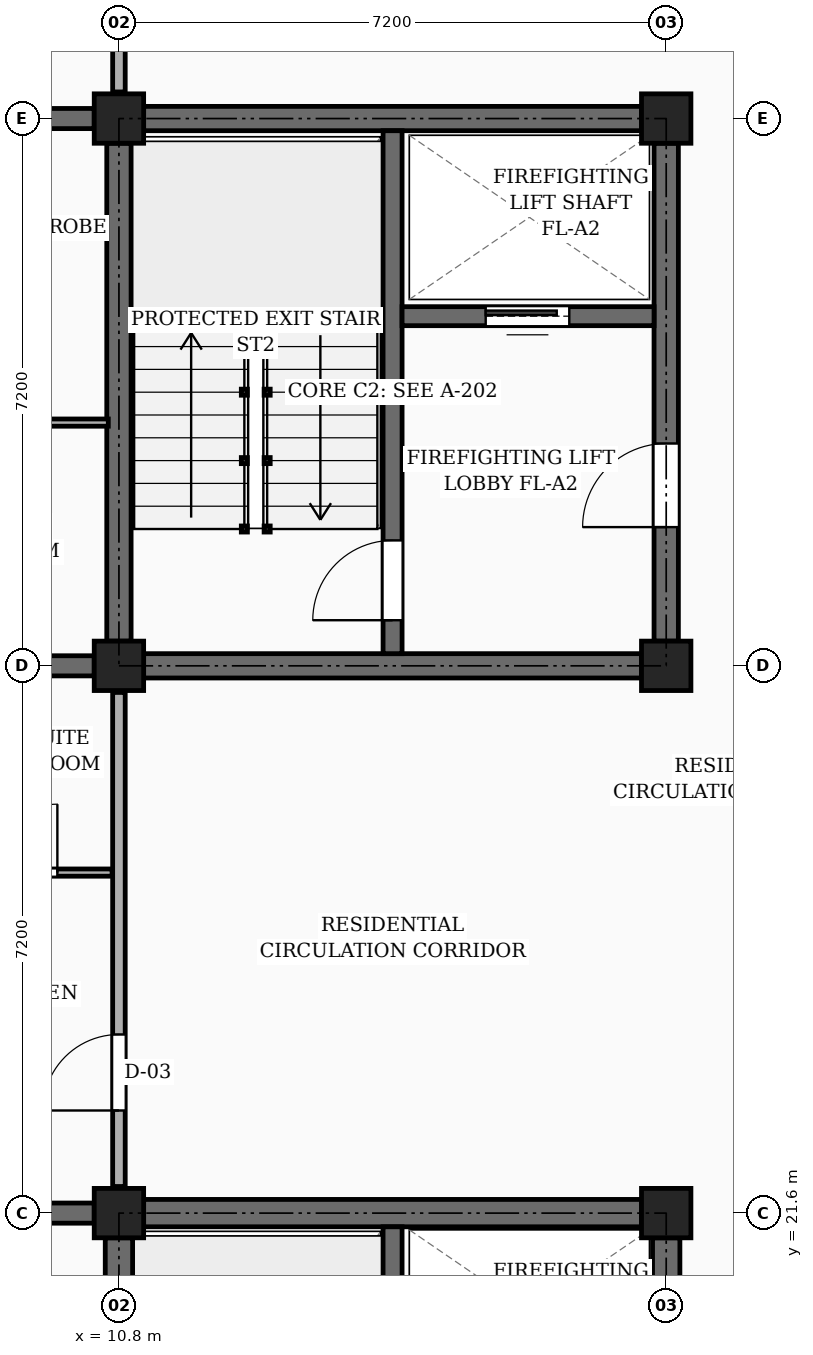
"""IFC4 building model, lengths in metres.
Left out: names, types, materials, properties, quantities, classifications, styles, units other than length and angle.
Written with IfcOpenShell. Run it as: python <this file> out.ifc"""

import sys

from ifc_helpers import new_model, si_unit, direction, frame, frame_2d, origin, origin_2d, place, context, subcontext, project, spatial, rectangle, extrude, element, fill, save


model = new_model("IFC4")
c1 = context("Model", 3, precision=1e-05, world=origin(), true_north=direction((0.0, 1.0)))
c2 = subcontext(c1, "Body", "Model", "MODEL_VIEW")
j1 = project(units=[si_unit("LENGTHUNIT", "METRE"), si_unit("PLANEANGLEUNIT", "RADIAN")], contexts=[c1])
p1 = place(None, origin())
s1 = spatial("IfcSite", under=j1, at=p1, CompositionType="ELEMENT")
p2 = place(p1, origin())
s2 = spatial("IfcBuilding", under=s1, at=p2, CompositionType="ELEMENT")
p3 = place(p2, frame((0.0, 0.0, 4.5)))
s3 = spatial("IfcBuildingStorey", under=s2, at=p3, CompositionType="ELEMENT", Elevation=4.5)
for number, where, z_axis, x_axis in (
    (1, (10.8, 21.6, 0.0), (0.0, 0.0, 1.0), (1.0, 0.0, 0.0)),
    (2, (10.8, 28.8, 0.0), (0.0, 0.0, 1.0), (1.0, 0.0, 0.0)),
    (3, (10.8, 36.0, 0.0), (0.0, 0.0, 1.0), (1.0, 0.0, 0.0)),
    (4, (18.0, 21.6, 0.0), (0.0, 0.0, 1.0), (1.0, 0.0, 0.0)),
    (5, (18.0, 28.8, 0.0), (0.0, 0.0, 1.0), (1.0, 0.0, 0.0)),
    (6, (18.0, 36.0, 0.0), (0.0, 0.0, 1.0), (1.0, 0.0, 0.0)),
):
    element("IfcColumn", number, at=place(p3, frame(where, z_axis=z_axis, x_axis=x_axis)), inside=s3, PredefinedType="COLUMN", context=c2, shape_type="SweptSolid", body=[
        extrude(rectangle(XDim=0.65, YDim=0.65, at=origin_2d()), origin(), (0.0, 0.0, 1.0), 3.15),
    ])
p4 = place(p3, frame((3.9, 21.6, 0.0), z_axis=(0.0, 0.0, 1.0), x_axis=(1.0, 0.0, 0.0)))
e7 = element("IfcWall", 7, at=p4, inside=s3, PredefinedType="SOLIDWALL", context=c2, shape_type="SweptSolid", body=[
    extrude(rectangle(XDim=6.575, YDim=0.265, at=frame_2d((3.288, 0.0))), origin(), (0.0, 0.0, 1.0), 2.17),
])
p5 = place(p3, frame((3.9, 28.8, 0.0), z_axis=(0.0, 0.0, 1.0), x_axis=(1.0, 0.0, 0.0)))
e8 = element("IfcWall", 8, at=p5, inside=s3, PredefinedType="SOLIDWALL", context=c2, shape_type="SweptSolid", body=[
    extrude(rectangle(XDim=6.575, YDim=0.265, at=frame_2d((3.288, 0.0))), origin(), (0.0, 0.0, 1.0), 2.17),
])
p6 = place(p5, frame((1.35, 0.0, 0.0)))
e9 = element("IfcOpeningElement", 9, at=p6, cuts=e8, PredefinedType="OPENING", context=c2, shape_type="SweptSolid", body=[
    extrude(rectangle(XDim=0.98, YDim=2.12, at=frame_2d((0.49, 1.06))), frame((0.0, 0.143, 0.0), z_axis=(0.0, -1.0, 0.0), x_axis=(1.0, 0.0, 0.0)), (0.0, 0.0, 1.0), 0.285),
])
p7 = place(p3, frame((3.9, 36.0, 0.0), z_axis=(0.0, 0.0, 1.0), x_axis=(1.0, 0.0, 0.0)))
e10 = element("IfcWall", 10, at=p7, inside=s3, PredefinedType="SOLIDWALL", context=c2, shape_type="SweptSolid", body=[
    extrude(rectangle(XDim=6.575, YDim=0.265, at=frame_2d((3.288, 0.0))), origin(), (0.0, 0.0, 1.0), 2.17),
])
p8 = place(p3, frame((10.8, 14.725, 0.0), z_axis=(0.0, 0.0, 1.0), x_axis=(0.0, 1.0, 0.0)))
e11 = element("IfcWall", 11, at=p8, inside=s3, PredefinedType="SHEAR", context=c2, shape_type="SweptSolid", body=[
    extrude(rectangle(XDim=6.55, YDim=0.36, at=frame_2d((3.275, 0.0))), origin(), (0.0, 0.0, 1.0), 2.87),
])
p9 = place(p3, frame((11.125, 21.6, 0.0), z_axis=(0.0, 0.0, 1.0), x_axis=(1.0, 0.0, 0.0)))
e12 = element("IfcWall", 12, at=p9, inside=s3, PredefinedType="SHEAR", context=c2, shape_type="SweptSolid", body=[
    extrude(rectangle(XDim=6.55, YDim=0.36, at=frame_2d((3.275, 0.0))), origin(), (0.0, 0.0, 1.0), 2.87),
])
p10 = place(p3, frame((18.0, 14.725, 0.0), z_axis=(0.0, 0.0, 1.0), x_axis=(0.0, 1.0, 0.0)))
e13 = element("IfcWall", 13, at=p10, inside=s3, PredefinedType="SHEAR", context=c2, shape_type="SweptSolid", body=[
    extrude(rectangle(XDim=6.55, YDim=0.36, at=frame_2d((3.275, 0.0))), origin(), (0.0, 0.0, 1.0), 2.87),
])
p11 = place(p10, frame((1.5, 0.0, 0.0)))
e14 = element("IfcOpeningElement", 14, at=p11, cuts=e13, PredefinedType="OPENING", context=c2, shape_type="SweptSolid", body=[
    extrude(rectangle(XDim=1.1, YDim=2.15, at=frame_2d((0.55, 1.075))), frame((0.0, 0.19, 0.0), z_axis=(0.0, -1.0, 0.0), x_axis=(1.0, 0.0, 0.0)), (0.0, 0.0, 1.0), 0.38),
])
p12 = place(p3, frame((14.4, 14.58, 0.0), z_axis=(0.0, 0.0, 1.0), x_axis=(0.0, 1.0, 0.0)))
e15 = element("IfcWall", 15, at=p12, inside=s3, PredefinedType="SHEAR", context=c2, shape_type="SweptSolid", body=[
    extrude(rectangle(XDim=6.84, YDim=0.25, at=frame_2d((3.42, 0.0))), origin(), (0.0, 0.0, 1.0), 2.87),
])
p13 = place(p12, frame((0.42, 0.0, 0.0)))
e16 = element("IfcOpeningElement", 16, at=p13, cuts=e15, PredefinedType="OPENING", context=c2, shape_type="SweptSolid", body=[
    extrude(rectangle(XDim=1.05, YDim=2.15, at=frame_2d((0.525, 1.075))), frame((0.0, 0.135, 0.0), z_axis=(0.0, -1.0, 0.0), x_axis=(1.0, 0.0, 0.0)), (0.0, 0.0, 1.0), 0.27),
])
for number, where, z_axis, x_axis in (
    (17, (10.8, 29.125, 0.0), (0.0, 0.0, 1.0), (0.0, 1.0, 0.0)),
    (18, (11.125, 36.0, 0.0), (0.0, 0.0, 1.0), (1.0, 0.0, 0.0)),
):
    element("IfcWall", number, at=place(p3, frame(where, z_axis=z_axis, x_axis=x_axis)), inside=s3, PredefinedType="SHEAR", context=c2, shape_type="SweptSolid", body=[
        extrude(rectangle(XDim=6.55, YDim=0.32, at=frame_2d((3.275, 0.0))), origin(), (0.0, 0.0, 1.0), 2.87),
    ])
p14 = place(p3, frame((18.0, 29.125, 0.0), z_axis=(0.0, 0.0, 1.0), x_axis=(0.0, 1.0, 0.0)))
e19 = element("IfcWall", 19, at=p14, inside=s3, PredefinedType="SHEAR", context=c2, shape_type="SweptSolid", body=[
    extrude(rectangle(XDim=6.55, YDim=0.32, at=frame_2d((3.275, 0.0))), origin(), (0.0, 0.0, 1.0), 2.87),
])
p15 = place(p14, frame((1.5, 0.0, 0.0)))
e20 = element("IfcOpeningElement", 20, at=p15, cuts=e19, PredefinedType="OPENING", context=c2, shape_type="SweptSolid", body=[
    extrude(rectangle(XDim=1.1, YDim=2.15, at=frame_2d((0.55, 1.075))), frame((0.0, 0.17, 0.0), z_axis=(0.0, -1.0, 0.0), x_axis=(1.0, 0.0, 0.0)), (0.0, 0.0, 1.0), 0.34),
])
p16 = place(p3, frame((11.125, 28.8, 0.0), z_axis=(0.0, 0.0, 1.0), x_axis=(1.0, 0.0, 0.0)))
e21 = element("IfcWall", 21, at=p16, inside=s3, PredefinedType="SHEAR", context=c2, shape_type="SweptSolid", body=[
    extrude(rectangle(XDim=6.55, YDim=0.32, at=frame_2d((3.275, 0.0))), origin(), (0.0, 0.0, 1.0), 2.87),
])
p17 = place(p3, frame((14.4, 28.96, 0.0), z_axis=(0.0, 0.0, 1.0), x_axis=(0.0, 1.0, 0.0)))
e22 = element("IfcWall", 22, at=p17, inside=s3, PredefinedType="SHEAR", context=c2, shape_type="SweptSolid", body=[
    extrude(rectangle(XDim=6.88, YDim=0.25, at=frame_2d((3.44, 0.0))), origin(), (0.0, 0.0, 1.0), 2.87),
])
p18 = place(p17, frame((0.44, 0.0, 0.0)))
e23 = element("IfcOpeningElement", 23, at=p18, cuts=e22, PredefinedType="OPENING", context=c2, shape_type="SweptSolid", body=[
    extrude(rectangle(XDim=1.05, YDim=2.15, at=frame_2d((0.525, 1.075))), frame((0.0, 0.135, 0.0), z_axis=(0.0, -1.0, 0.0), x_axis=(1.0, 0.0, 0.0)), (0.0, 0.0, 1.0), 0.27),
])
p19 = place(p3, frame((14.525, 33.4, 0.0), z_axis=(0.0, 0.0, 1.0), x_axis=(1.0, 0.0, 0.0)))
e24 = element("IfcWall", 24, at=p19, inside=s3, PredefinedType="SHEAR", context=c2, shape_type="SweptSolid", body=[
    extrude(rectangle(XDim=3.315, YDim=0.25, at=frame_2d((1.658, 0.0))), origin(), (0.0, 0.0, 1.0), 2.87),
])
p20 = place(p19, frame((1.1, 0.0, 0.0)))
e25 = element("IfcOpeningElement", 25, at=p20, cuts=e24, PredefinedType="OPENING", context=c2, shape_type="SweptSolid", body=[
    extrude(rectangle(XDim=1.1, YDim=2.2, at=frame_2d((0.55, 1.1))), frame((0.0, 0.135, 0.0), z_axis=(0.0, -1.0, 0.0), x_axis=(1.0, 0.0, 0.0)), (0.0, 0.0, 1.0), 0.27),
])
p21 = place(p3, frame((10.8, 21.95, 0.0), z_axis=(0.0, 0.0, 1.0), x_axis=(0.0, 1.0, 0.0)))
e26 = element("IfcWall", 26, at=p21, inside=s3, PredefinedType="PARTITIONING", context=c2, shape_type="SweptSolid", body=[
    extrude(rectangle(XDim=6.5, YDim=0.165, at=frame_2d((3.25, 0.0))), origin(), (0.0, 0.0, 1.0), 2.22),
])
p22 = place(p21, frame((1.0, 0.0, 0.0)))
e27 = element("IfcOpeningElement", 27, at=p22, cuts=e26, PredefinedType="OPENING", context=c2, shape_type="SweptSolid", body=[
    extrude(rectangle(XDim=1.0, YDim=2.15, at=frame_2d((0.5, 1.075))), frame((0.0, 0.093, 0.0), z_axis=(0.0, -1.0, 0.0), x_axis=(1.0, 0.0, 0.0)), (0.0, 0.0, 1.0), 0.185),
])
p23 = place(p3, frame((10.8, 36.35, 0.0), z_axis=(0.0, 0.0, 1.0), x_axis=(0.0, 1.0, 0.0)))
e28 = element("IfcWall", 28, at=p23, inside=s3, PredefinedType="PARTITIONING", context=c2, shape_type="SweptSolid", body=[
    extrude(rectangle(XDim=6.5, YDim=0.165, at=frame_2d((3.25, 0.0))), origin(), (0.0, 0.0, 1.0), 2.22),
])
p24 = place(p23, frame((1.0, 0.0, 0.0)))
e29 = element("IfcOpeningElement", 29, at=p24, cuts=e28, PredefinedType="OPENING", context=c2, shape_type="SweptSolid", body=[
    extrude(rectangle(XDim=0.94, YDim=2.12, at=frame_2d((0.47, 1.06))), frame((0.0, 0.093, 0.0), z_axis=(0.0, -1.0, 0.0), x_axis=(1.0, 0.0, 0.0)), (0.0, 0.0, 1.0), 0.185),
])
p25 = place(p3, frame((8.37, 26.08, 0.0), z_axis=(0.0, 0.0, 1.0), x_axis=(1.0, 0.0, 0.0)))
e30 = element("IfcWall", 30, at=p25, inside=s3, PredefinedType="PARTITIONING", context=c2, shape_type="SweptSolid", body=[
    extrude(rectangle(XDim=2.34, YDim=0.095, at=frame_2d((1.17, 0.0))), origin(), (0.0, 0.0, 1.0), 2.305),
])
p26 = place(p25, frame((0.72, 0.0, 0.0)))
e31 = element("IfcOpeningElement", 31, at=p26, cuts=e30, PredefinedType="OPENING", context=c2, shape_type="SweptSolid", body=[
    extrude(rectangle(XDim=0.9, YDim=2.05, at=frame_2d((0.45, 1.025))), frame((0.0, 0.058, 0.0), z_axis=(0.0, -1.0, 0.0), x_axis=(1.0, 0.0, 0.0)), (0.0, 0.0, 1.0), 0.115),
])
p27 = place(p3, frame((7.27, 32.0, 0.0), z_axis=(0.0, 0.0, 1.0), x_axis=(1.0, 0.0, 0.0)))
e32 = element("IfcWall", 32, at=p27, inside=s3, PredefinedType="PARTITIONING", context=c2, shape_type="SweptSolid", body=[
    extrude(rectangle(XDim=3.39, YDim=0.095, at=frame_2d((1.695, 0.0))), origin(), (0.0, 0.0, 1.0), 2.305),
])
p28 = place(p15, frame((1.1, 0.0, 0.0), z_axis=(0.0, 0.0, 1.0), x_axis=(-1.0, 0.0, 0.0)))
e33 = element("IfcDoor", 33, at=p28, inside=s3, OperationType="SINGLE_SWING_LEFT", PredefinedType="DOOR", context=c2, shape_type="SweptSolid", body=[
    extrude(rectangle(XDim=1.1, YDim=2.15, at=frame_2d((0.55, 1.075))), frame((0.0, 0.025, 0.0), z_axis=(0.0, -1.0, 0.0), x_axis=(1.0, 0.0, 0.0)), (0.0, 0.0, 1.0), 0.05),
])
fill(e20, e33)
p29 = place(p18, origin())
e34 = element("IfcDoor", 34, at=p29, inside=s3, OperationType="SINGLE_SWING_LEFT", PredefinedType="DOOR", context=c2, shape_type="SweptSolid", body=[
    extrude(rectangle(XDim=1.05, YDim=2.15, at=frame_2d((0.525, 1.075))), frame((0.0, 0.025, 0.0), z_axis=(0.0, -1.0, 0.0), x_axis=(1.0, 0.0, 0.0)), (0.0, 0.0, 1.0), 0.05),
])
fill(e23, e34)
p30 = place(p20, origin())
e35 = element("IfcDoor", 35, at=p30, inside=s3, OperationType="SLIDING_TO_LEFT", PredefinedType="DOOR", context=c2, shape_type="SweptSolid", body=[
    extrude(rectangle(XDim=1.1, YDim=2.2, at=frame_2d((0.55, 1.1))), frame((0.0, 0.025, 0.0), z_axis=(0.0, -1.0, 0.0), x_axis=(1.0, 0.0, 0.0)), (0.0, 0.0, 1.0), 0.05),
])
fill(e25, e35)
p31 = place(p22, origin())
e36 = element("IfcDoor", 36, at=p31, inside=s3, OperationType="SINGLE_SWING_LEFT", PredefinedType="DOOR", context=c2, shape_type="SweptSolid", body=[
    extrude(rectangle(XDim=1.0, YDim=2.15, at=frame_2d((0.5, 1.075))), frame((0.0, 0.025, 0.0), z_axis=(0.0, -1.0, 0.0), x_axis=(1.0, 0.0, 0.0)), (0.0, 0.0, 1.0), 0.05),
])
fill(e27, e36)
p32 = place(p26, origin())
e37 = element("IfcDoor", 37, at=p32, inside=s3, OperationType="SINGLE_SWING_RIGHT", PredefinedType="DOOR", context=c2, shape_type="SweptSolid", body=[
    extrude(rectangle(XDim=0.9, YDim=2.05, at=frame_2d((0.45, 1.025))), frame((0.0, 0.025, 0.0), z_axis=(0.0, -1.0, 0.0), x_axis=(1.0, 0.0, 0.0)), (0.0, 0.0, 1.0), 0.05),
])
fill(e31, e37)
save(model, sys.argv[1])
